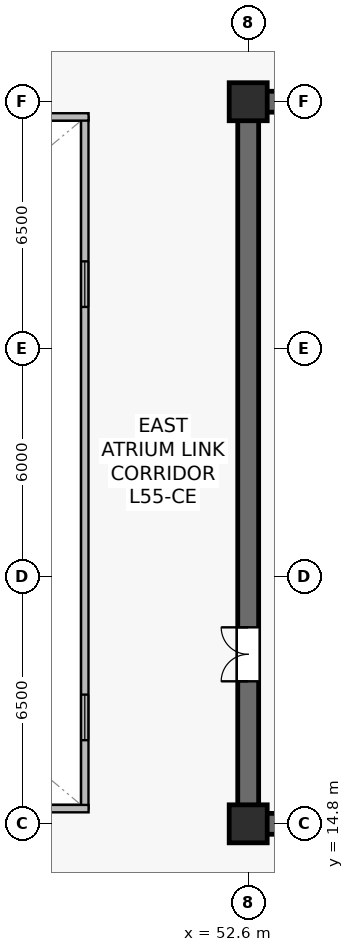
"""IFC4 building model, lengths in metres.
Left out: names, types, materials, properties, quantities, classifications, styles, units other than length and angle.
Written with IfcOpenShell. Run it as: python <this file> out.ifc"""

import sys

from ifc_helpers import new_model, si_unit, direction, frame, frame_2d, origin, origin_2d, place, context, subcontext, project, spatial, rectangle, extrude, source, transform, mapped, element, fill, save


model = new_model("IFC4")
c1 = context("Model", 3, precision=1e-05, world=origin(), true_north=direction((0.0, 1.0)))
c2 = subcontext(c1, "Body", "Model", "MODEL_VIEW")
j1 = project(units=[si_unit("LENGTHUNIT", "METRE"), si_unit("PLANEANGLEUNIT", "RADIAN")], contexts=[c1])
p1 = place(None, origin())
s1 = spatial("IfcSite", under=j1, at=p1, CompositionType="ELEMENT")
p2 = place(p1, origin())
s2 = spatial("IfcBuilding", under=s1, at=p2, CompositionType="ELEMENT")
p3 = place(p2, frame((0.0, 0.0, 230.1)))
s3 = spatial("IfcBuildingStorey", under=s2, at=p3, CompositionType="ELEMENT", Elevation=230.1)
p4 = place(p3, frame((52.325, 14.8, 0.0), z_axis=(0.0, 0.0, 1.0), x_axis=(1.0, 0.0, 0.0)))
e1 = element("IfcWall", 1, at=p4, inside=s3, PredefinedType="SHEAR", context=c2, shape_type="SweptSolid", body=[
    extrude(rectangle(XDim=15.35, YDim=0.55, at=frame_2d((7.675, 0.0))), origin(), (0.0, 0.0, 1.0), 3.8),
])
p5 = place(p3, frame((52.325, 33.8, 0.0), z_axis=(0.0, 0.0, 1.0), x_axis=(1.0, 0.0, 0.0)))
e2 = element("IfcWall", 2, at=p5, inside=s3, PredefinedType="SHEAR", context=c2, shape_type="SweptSolid", body=[
    extrude(rectangle(XDim=15.35, YDim=0.55, at=frame_2d((7.675, 0.0))), origin(), (0.0, 0.0, 1.0), 3.8),
])
p6 = place(p5, frame((6.075, 0.0, 0.0)))
e3 = element("IfcOpeningElement", 3, at=p6, cuts=e2, PredefinedType="OPENING", context=c2, shape_type="SweptSolid", body=[
    extrude(rectangle(XDim=0.95, YDim=2.15, at=frame_2d((0.475, 1.075))), frame((0.0, 0.285, 0.0), z_axis=(0.0, -1.0, 0.0), x_axis=(1.0, 0.0, 0.0)), (0.0, 0.0, 1.0), 0.57),
])
p7 = place(p5, frame((2.535, 0.0, 0.0)))
e4 = element("IfcOpeningElement", 4, at=p7, cuts=e2, PredefinedType="OPENING", context=c2, shape_type="SweptSolid", body=[
    extrude(rectangle(XDim=0.95, YDim=2.15, at=frame_2d((0.475, 1.075))), frame((0.0, 0.285, 0.0), z_axis=(0.0, -1.0, 0.0), x_axis=(1.0, 0.0, 0.0)), (0.0, 0.0, 1.0), 0.57),
])
p8 = place(p3, frame((52.6, 15.075, 0.0), z_axis=(0.0, 0.0, 1.0), x_axis=(0.0, 1.0, 0.0)))
e5 = element("IfcWall", 5, at=p8, inside=s3, PredefinedType="SHEAR", context=c2, shape_type="SweptSolid", body=[
    extrude(rectangle(XDim=18.45, YDim=0.55, at=frame_2d((9.225, 0.0))), origin(), (0.0, 0.0, 1.0), 3.8),
])
p9 = place(p8, frame((3.475, 0.0, 0.0)))
e6 = element("IfcOpeningElement", 6, at=p9, cuts=e5, PredefinedType="OPENING", context=c2, shape_type="SweptSolid", body=[
    extrude(rectangle(XDim=1.42, YDim=2.2, at=frame_2d((0.71, 1.1))), frame((0.0, 0.285, 0.0), z_axis=(0.0, -1.0, 0.0), x_axis=(1.0, 0.0, 0.0)), (0.0, 0.0, 1.0), 0.57),
])
m1 = source(origin(), c2, "Body", "SweptSolid", [
    extrude(rectangle(XDim=1.0, YDim=1.0, at=origin_2d()), origin(), (0.0, 0.0, 1.0), 4.1),
])
for number, where, z_axis, x_axis in (
    (7, (52.6, 14.8, 0.0), (0.0, 0.0, 1.0), (1.0, 0.0, 0.0)),
    (8, (52.6, 33.8, 0.0), (0.0, 0.0, 1.0), (1.0, 0.0, 0.0)),
):
    element("IfcColumn", number, at=place(p3, frame(where, z_axis=z_axis, x_axis=x_axis)), inside=s3, PredefinedType="COLUMN", context=c2, shape_type="MappedRepresentation", body=[
        mapped(m1, transform((0.0, 0.0, 0.0), scale=1.0)),
    ])
p10 = place(p3, frame((48.3, 15.2, 0.0), z_axis=(0.0, 0.0, 1.0), x_axis=(0.0, 1.0, 0.0)))
e9 = element("IfcWall", 9, at=p10, inside=s3, PredefinedType="SOLIDWALL", context=c2, shape_type="SweptSolid", body=[
    extrude(rectangle(XDim=18.2, YDim=0.195, at=frame_2d((9.1, 0.0))), origin(), (0.0, 0.0, 1.0), 3.8),
])
p11 = place(p10, frame((1.8, 0.0, 0.9)))
e10 = element("IfcOpeningElement", 10, at=p11, cuts=e9, PredefinedType="OPENING", context=c2, shape_type="SweptSolid", body=[
    extrude(rectangle(XDim=1.2, YDim=1.35, at=frame_2d((0.6, 0.675))), frame((0.0, 0.107, 0.0), z_axis=(0.0, -1.0, 0.0), x_axis=(1.0, 0.0, 0.0)), (0.0, 0.0, 1.0), 0.215),
])
p12 = place(p10, frame((13.2, 0.0, 0.9)))
e11 = element("IfcOpeningElement", 11, at=p12, cuts=e9, PredefinedType="OPENING", context=c2, shape_type="SweptSolid", body=[
    extrude(rectangle(XDim=1.2, YDim=1.35, at=frame_2d((0.6, 0.675))), frame((0.0, 0.107, 0.0), z_axis=(0.0, -1.0, 0.0), x_axis=(1.0, 0.0, 0.0)), (0.0, 0.0, 1.0), 0.215),
])
for number, where, z_axis, x_axis in (
    (12, (26.4, 15.2, 0.0), (0.0, 0.0, 1.0), (1.0, 0.0, 0.0)),
    (13, (26.4, 33.4, 0.0), (0.0, 0.0, 1.0), (1.0, 0.0, 0.0)),
):
    element("IfcWall", number, at=place(p3, frame(where, z_axis=z_axis, x_axis=x_axis)), inside=s3, PredefinedType="SOLIDWALL", context=c2, shape_type="SweptSolid", body=[
        extrude(rectangle(XDim=22.0, YDim=0.195, at=frame_2d((11.0, 0.0))), origin(), (0.0, 0.0, 1.0), 3.8),
    ])
m2 = source(origin(), c2, "Body", "SweptSolid", [
    extrude(rectangle(XDim=1.2, YDim=1.35, at=frame_2d((0.6, 0.675))), frame((0.0, 0.03, 0.0), z_axis=(0.0, -1.0, 0.0), x_axis=(1.0, 0.0, 0.0)), (0.0, 0.0, 1.0), 0.06),
])
p13 = place(p11, origin())
e14 = element("IfcWindow", 14, at=p13, inside=s3, PartitioningType="SINGLE_PANEL", PredefinedType="WINDOW", context=c2, shape_type="MappedRepresentation", body=[
    mapped(m2, transform((0.0, 0.0, 0.0), scale=1.0)),
])
fill(e10, e14)
p14 = place(p12, origin())
e15 = element("IfcWindow", 15, at=p14, inside=s3, PartitioningType="SINGLE_PANEL", PredefinedType="WINDOW", context=c2, shape_type="MappedRepresentation", body=[
    mapped(m2, transform((0.0, 0.0, 0.0), scale=1.0)),
])
fill(e11, e15)
m3 = source(origin(), c2, "Body", "SweptSolid", [
    extrude(rectangle(XDim=1.42, YDim=2.2, at=frame_2d((0.71, 1.1))), frame((0.0, 0.025, 0.0), z_axis=(0.0, -1.0, 0.0), x_axis=(1.0, 0.0, 0.0)), (0.0, 0.0, 1.0), 0.05),
])
p15 = place(p9, origin())
e16 = element("IfcDoor", 16, at=p15, inside=s3, OperationType="DOUBLE_DOOR_SINGLE_SWING", PredefinedType="DOOR", context=c2, shape_type="MappedRepresentation", body=[
    mapped(m3, transform((0.0, 0.0, 0.0), scale=1.0)),
])
fill(e6, e16)
save(model, sys.argv[1])
